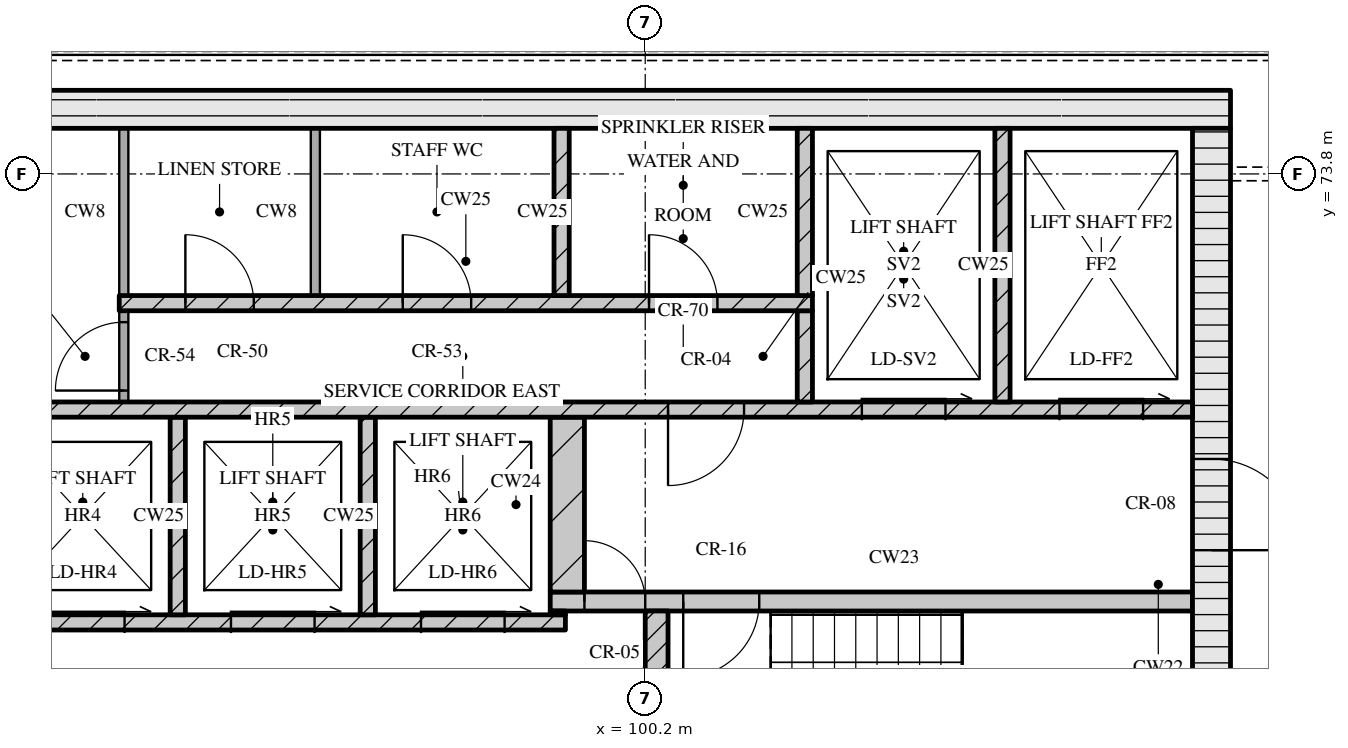
"""IFC4 building model, lengths in metres.
Left out: names, types, materials, properties, quantities, classifications, styles, units other than length and angle.
Written with IfcOpenShell. Run it as: python <this file> out.ifc"""

import sys

from ifc_helpers import new_model, si_unit, direction, frame, frame_2d, origin, place, context, subcontext, project, spatial, rectangle, extrude, element, fill, save


model = new_model("IFC4")
c1 = context("Model", 3, precision=1e-05, world=origin(), true_north=direction((0.0, 1.0)))
c2 = subcontext(c1, "Body", "Model", "MODEL_VIEW")
j1 = project(units=[si_unit("LENGTHUNIT", "METRE"), si_unit("PLANEANGLEUNIT", "RADIAN")], contexts=[c1])
p1 = place(None, origin())
s1 = spatial("IfcSite", under=j1, at=p1, CompositionType="ELEMENT")
p2 = place(p1, origin())
s2 = spatial("IfcBuilding", under=s1, at=p2, CompositionType="ELEMENT")
p3 = place(p2, frame((0.0, 0.0, 267.15)))
s3 = spatial("IfcBuildingStorey", under=s2, at=p3, CompositionType="ELEMENT", Elevation=267.15)
p4 = place(p3, frame((67.3, 74.65, 0.0), z_axis=(0.0, 0.0, 1.0), x_axis=(1.0, 0.0, 0.0)))
e1 = element("IfcWall", 1, at=p4, inside=s3, PredefinedType="SOLIDWALL", context=c2, shape_type="SweptSolid", body=[
    extrude(rectangle(XDim=40.6, YDim=0.5, at=frame_2d((20.3, 0.0))), origin(), (0.0, 0.0, 1.0), 3.32),
])
p5 = place(p3, frame((107.65, 62.4, 0.0), z_axis=(0.0, 0.0, 1.0), x_axis=(0.0, 1.0, 0.0)))
e2 = element("IfcWall", 2, at=p5, inside=s3, PredefinedType="SOLIDWALL", context=c2, shape_type="SweptSolid", body=[
    extrude(rectangle(XDim=12.0, YDim=0.5, at=frame_2d((6.0, 0.0))), origin(), (0.0, 0.0, 1.0), 3.32),
])
p6 = place(p5, frame((6.45, 0.0, 0.0)))
e3 = element("IfcOpeningElement", 3, at=p6, cuts=e2, PredefinedType="OPENING", context=c2, shape_type="SweptSolid", body=[
    extrude(rectangle(XDim=1.2, YDim=2.1, at=frame_2d((0.6, 1.05))), frame((0.0, 0.26, 0.0), z_axis=(0.0, -1.0, 0.0), x_axis=(1.0, 0.0, 0.0)), (0.0, 0.0, 1.0), 0.52),
])
p7 = place(p3, frame((100.35, 65.2, 0.0), z_axis=(0.0, 0.0, 1.0), x_axis=(0.0, 1.0, 0.0)))
e4 = element("IfcWall", 4, at=p7, inside=s3, PredefinedType="SOLIDWALL", context=c2, shape_type="SweptSolid", body=[
    extrude(rectangle(XDim=2.85, YDim=0.3, at=frame_2d((1.425, 0.0))), origin(), (0.0, 0.0, 1.0), 3.32),
])
p8 = place(p3, frame((76.05, 67.9, 0.0), z_axis=(0.0, 0.0, 1.0), x_axis=(1.0, 0.0, 0.0)))
e5 = element("IfcWall", 5, at=p8, inside=s3, PredefinedType="SOLIDWALL", context=c2, shape_type="SweptSolid", body=[
    extrude(rectangle(XDim=23.1, YDim=0.2, at=frame_2d((11.55, 0.0))), origin(), (0.0, 0.0, 1.0), 3.32),
])
p9 = place(p8, frame((1.4, 0.0, 0.0)))
e6 = element("IfcOpeningElement", 6, at=p9, cuts=e5, PredefinedType="OPENING", context=c2, shape_type="SweptSolid", body=[
    extrude(rectangle(XDim=0.9, YDim=2.1, at=frame_2d((0.45, 1.05))), frame((0.0, 0.11, 0.0), z_axis=(0.0, -1.0, 0.0), x_axis=(1.0, 0.0, 0.0)), (0.0, 0.0, 1.0), 0.22),
])
p10 = place(p8, frame((5.11, 0.0, 0.0)))
e7 = element("IfcOpeningElement", 7, at=p10, cuts=e5, PredefinedType="OPENING", context=c2, shape_type="SweptSolid", body=[
    extrude(rectangle(XDim=0.9, YDim=2.1, at=frame_2d((0.45, 1.05))), frame((0.0, 0.11, 0.0), z_axis=(0.0, -1.0, 0.0), x_axis=(1.0, 0.0, 0.0)), (0.0, 0.0, 1.0), 0.22),
])
p11 = place(p8, frame((8.45, 0.0, 0.0)))
e8 = element("IfcOpeningElement", 8, at=p11, cuts=e5, PredefinedType="OPENING", context=c2, shape_type="SweptSolid", body=[
    extrude(rectangle(XDim=0.9, YDim=2.1, at=frame_2d((0.45, 1.05))), frame((0.0, 0.11, 0.0), z_axis=(0.0, -1.0, 0.0), x_axis=(1.0, 0.0, 0.0)), (0.0, 0.0, 1.0), 0.22),
])
p12 = place(p8, frame((10.91, 0.0, 0.0)))
e9 = element("IfcOpeningElement", 9, at=p12, cuts=e5, PredefinedType="OPENING", context=c2, shape_type="SweptSolid", body=[
    extrude(rectangle(XDim=0.9, YDim=2.1, at=frame_2d((0.45, 1.05))), frame((0.0, 0.11, 0.0), z_axis=(0.0, -1.0, 0.0), x_axis=(1.0, 0.0, 0.0)), (0.0, 0.0, 1.0), 0.22),
])
p13 = place(p8, frame((13.55, 0.0, 0.0)))
e10 = element("IfcOpeningElement", 10, at=p13, cuts=e5, PredefinedType="OPENING", context=c2, shape_type="SweptSolid", body=[
    extrude(rectangle(XDim=1.0, YDim=2.1, at=frame_2d((0.5, 1.05))), frame((0.0, 0.11, 0.0), z_axis=(0.0, -1.0, 0.0), x_axis=(1.0, 0.0, 0.0)), (0.0, 0.0, 1.0), 0.22),
])
p14 = place(p8, frame((16.2, 0.0, 0.0)))
e11 = element("IfcOpeningElement", 11, at=p14, cuts=e5, PredefinedType="OPENING", context=c2, shape_type="SweptSolid", body=[
    extrude(rectangle(XDim=1.1, YDim=2.1, at=frame_2d((0.55, 1.05))), frame((0.0, 0.11, 0.0), z_axis=(0.0, -1.0, 0.0), x_axis=(1.0, 0.0, 0.0)), (0.0, 0.0, 1.0), 0.22),
])
p15 = place(p8, frame((18.7, 0.0, 0.0)))
e12 = element("IfcOpeningElement", 12, at=p15, cuts=e5, PredefinedType="OPENING", context=c2, shape_type="SweptSolid", body=[
    extrude(rectangle(XDim=1.1, YDim=2.1, at=frame_2d((0.55, 1.05))), frame((0.0, 0.11, 0.0), z_axis=(0.0, -1.0, 0.0), x_axis=(1.0, 0.0, 0.0)), (0.0, 0.0, 1.0), 0.22),
])
p16 = place(p8, frame((21.2, 0.0, 0.0)))
e13 = element("IfcOpeningElement", 13, at=p16, cuts=e5, PredefinedType="OPENING", context=c2, shape_type="SweptSolid", body=[
    extrude(rectangle(XDim=1.1, YDim=2.1, at=frame_2d((0.55, 1.05))), frame((0.0, 0.11, 0.0), z_axis=(0.0, -1.0, 0.0), x_axis=(1.0, 0.0, 0.0)), (0.0, 0.0, 1.0), 0.22),
])
for number, where, z_axis, x_axis in (
    (14, (94.05, 68.0, 0.0), (0.0, 0.0, 1.0), (0.0, 1.0, 0.0)),
    (15, (96.55, 68.0, 0.0), (0.0, 0.0, 1.0), (0.0, 1.0, 0.0)),
):
    element("IfcWall", number, at=place(p3, frame(where, z_axis=z_axis, x_axis=x_axis)), inside=s3, PredefinedType="SOLIDWALL", context=c2, shape_type="SweptSolid", body=[
        extrude(rectangle(XDim=2.6, YDim=0.2, at=frame_2d((1.3, 0.0))), origin(), (0.0, 0.0, 1.0), 3.32),
    ])
p17 = place(p3, frame((98.95, 68.025, 0.0), z_axis=(0.0, 0.0, 1.0), x_axis=(1.0, 0.0, 0.0)))
e16 = element("IfcWall", 16, at=p17, inside=s3, PredefinedType="SOLIDWALL", context=c2, shape_type="SweptSolid", body=[
    extrude(rectangle(XDim=0.2, YDim=0.05, at=frame_2d((0.1, 0.0))), origin(), (0.0, 0.0, 1.0), 3.32),
])
p18 = place(p3, frame((98.95, 68.175, 0.0), z_axis=(0.0, 0.0, 1.0), x_axis=(1.0, 0.0, 0.0)))
e17 = element("IfcWall", 17, at=p18, inside=s3, PredefinedType="SOLIDWALL", context=c2, shape_type="SweptSolid", body=[
    extrude(rectangle(XDim=8.45, YDim=0.25, at=frame_2d((4.225, 0.0))), origin(), (0.0, 0.0, 1.0), 3.32),
])
p19 = place(p18, frame((0.45, 0.0, 0.0)))
e18 = element("IfcOpeningElement", 18, at=p19, cuts=e17, PredefinedType="OPENING", context=c2, shape_type="SweptSolid", body=[
    extrude(rectangle(XDim=0.8, YDim=2.1, at=frame_2d((0.4, 1.05))), frame((0.0, 0.135, 0.0), z_axis=(0.0, -1.0, 0.0), x_axis=(1.0, 0.0, 0.0)), (0.0, 0.0, 1.0), 0.27),
])
p20 = place(p18, frame((1.75, 0.0, 0.0)))
e19 = element("IfcOpeningElement", 19, at=p20, cuts=e17, PredefinedType="OPENING", context=c2, shape_type="SweptSolid", body=[
    extrude(rectangle(XDim=1.0, YDim=2.1, at=frame_2d((0.5, 1.05))), frame((0.0, 0.135, 0.0), z_axis=(0.0, -1.0, 0.0), x_axis=(1.0, 0.0, 0.0)), (0.0, 0.0, 1.0), 0.27),
])
p21 = place(p3, frame((99.175, 68.3, 0.0), z_axis=(0.0, 0.0, 1.0), x_axis=(0.0, 1.0, 0.0)))
e20 = element("IfcWall", 20, at=p21, inside=s3, PredefinedType="SOLIDWALL", context=c2, shape_type="SweptSolid", body=[
    extrude(rectangle(XDim=2.3, YDim=0.45, at=frame_2d((1.15, 0.0))), origin(), (0.0, 0.0, 1.0), 3.32),
])
p22 = place(p3, frame((67.8, 70.7, 0.0), z_axis=(0.0, 0.0, 1.0), x_axis=(1.0, 0.0, 0.0)))
e21 = element("IfcWall", 21, at=p22, inside=s3, PredefinedType="SOLIDWALL", context=c2, shape_type="SweptSolid", body=[
    extrude(rectangle(XDim=39.6, YDim=0.2, at=frame_2d((19.8, 0.0))), origin(), (0.0, 0.0, 1.0), 3.32),
])
p23 = place(p22, frame((0.65, 0.0, 0.0)))
e22 = element("IfcOpeningElement", 22, at=p23, cuts=e21, PredefinedType="OPENING", context=c2, shape_type="SweptSolid", body=[
    extrude(rectangle(XDim=1.1, YDim=2.1, at=frame_2d((0.55, 1.05))), frame((0.0, 0.11, 0.0), z_axis=(0.0, -1.0, 0.0), x_axis=(1.0, 0.0, 0.0)), (0.0, 0.0, 1.0), 0.22),
])
p24 = place(p22, frame((3.25, 0.0, 0.0)))
e23 = element("IfcOpeningElement", 23, at=p24, cuts=e21, PredefinedType="OPENING", context=c2, shape_type="SweptSolid", body=[
    extrude(rectangle(XDim=1.1, YDim=2.1, at=frame_2d((0.55, 1.05))), frame((0.0, 0.11, 0.0), z_axis=(0.0, -1.0, 0.0), x_axis=(1.0, 0.0, 0.0)), (0.0, 0.0, 1.0), 0.22),
])
p25 = place(p22, frame((5.9, 0.0, 0.0)))
e24 = element("IfcOpeningElement", 24, at=p25, cuts=e21, PredefinedType="OPENING", context=c2, shape_type="SweptSolid", body=[
    extrude(rectangle(XDim=1.0, YDim=2.1, at=frame_2d((0.5, 1.05))), frame((0.0, 0.11, 0.0), z_axis=(0.0, -1.0, 0.0), x_axis=(1.0, 0.0, 0.0)), (0.0, 0.0, 1.0), 0.22),
])
p26 = place(p22, frame((21.7, 0.0, 0.0)))
e25 = element("IfcOpeningElement", 25, at=p26, cuts=e21, PredefinedType="OPENING", context=c2, shape_type="SweptSolid", body=[
    extrude(rectangle(XDim=1.0, YDim=2.1, at=frame_2d((0.5, 1.05))), frame((0.0, 0.11, 0.0), z_axis=(0.0, -1.0, 0.0), x_axis=(1.0, 0.0, 0.0)), (0.0, 0.0, 1.0), 0.22),
])
p27 = place(p22, frame((32.7, 0.0, 0.0)))
e26 = element("IfcOpeningElement", 26, at=p27, cuts=e21, PredefinedType="OPENING", context=c2, shape_type="SweptSolid", body=[
    extrude(rectangle(XDim=1.0, YDim=2.1, at=frame_2d((0.5, 1.05))), frame((0.0, 0.11, 0.0), z_axis=(0.0, -1.0, 0.0), x_axis=(1.0, 0.0, 0.0)), (0.0, 0.0, 1.0), 0.22),
])
p28 = place(p22, frame((35.25, 0.0, 0.0)))
e27 = element("IfcOpeningElement", 27, at=p28, cuts=e21, PredefinedType="OPENING", context=c2, shape_type="SweptSolid", body=[
    extrude(rectangle(XDim=1.1, YDim=2.1, at=frame_2d((0.55, 1.05))), frame((0.0, 0.11, 0.0), z_axis=(0.0, -1.0, 0.0), x_axis=(1.0, 0.0, 0.0)), (0.0, 0.0, 1.0), 0.22),
])
p29 = place(p22, frame((37.85, 0.0, 0.0)))
e28 = element("IfcOpeningElement", 28, at=p29, cuts=e21, PredefinedType="OPENING", context=c2, shape_type="SweptSolid", body=[
    extrude(rectangle(XDim=1.1, YDim=2.1, at=frame_2d((0.55, 1.05))), frame((0.0, 0.11, 0.0), z_axis=(0.0, -1.0, 0.0), x_axis=(1.0, 0.0, 0.0)), (0.0, 0.0, 1.0), 0.22),
])
p30 = place(p3, frame((93.34, 70.8, 0.0), z_axis=(0.0, 0.0, 1.0), x_axis=(0.0, 1.0, 0.0)))
e29 = element("IfcWall", 29, at=p30, inside=s3, PredefinedType="PARTITIONING", context=c2, shape_type="SweptSolid", body=[
    extrude(rectangle(XDim=1.2, YDim=0.12, at=frame_2d((0.6, 0.0))), origin(), (0.0, 0.0, 1.0), 3.32),
])
p31 = place(p30, frame((0.15, 0.0, 0.0)))
e30 = element("IfcOpeningElement", 30, at=p31, cuts=e29, PredefinedType="OPENING", context=c2, shape_type="SweptSolid", body=[
    extrude(rectangle(XDim=0.9, YDim=2.1, at=frame_2d((0.45, 1.05))), frame((0.0, 0.07, 0.0), z_axis=(0.0, -1.0, 0.0), x_axis=(1.0, 0.0, 0.0)), (0.0, 0.0, 1.0), 0.14),
])
p32 = place(p3, frame((102.3, 70.8, 0.0), z_axis=(0.0, 0.0, 1.0), x_axis=(0.0, 1.0, 0.0)))
e31 = element("IfcWall", 31, at=p32, inside=s3, PredefinedType="SOLIDWALL", context=c2, shape_type="SweptSolid", body=[
    extrude(rectangle(XDim=1.2, YDim=0.2, at=frame_2d((0.6, 0.0))), origin(), (0.0, 0.0, 1.0), 3.32),
])
p33 = place(p3, frame((104.9, 70.8, 0.0), z_axis=(0.0, 0.0, 1.0), x_axis=(0.0, 1.0, 0.0)))
e32 = element("IfcWall", 32, at=p33, inside=s3, PredefinedType="SOLIDWALL", context=c2, shape_type="SweptSolid", body=[
    extrude(rectangle(XDim=3.6, YDim=0.2, at=frame_2d((1.8, 0.0))), origin(), (0.0, 0.0, 1.0), 3.32),
])
p34 = place(p3, frame((93.28, 72.1, 0.0), z_axis=(0.0, 0.0, 1.0), x_axis=(1.0, 0.0, 0.0)))
e33 = element("IfcWall", 33, at=p34, inside=s3, PredefinedType="SOLIDWALL", context=c2, shape_type="SweptSolid", body=[
    extrude(rectangle(XDim=9.12, YDim=0.2, at=frame_2d((4.56, 0.0))), origin(), (0.0, 0.0, 1.0), 3.32),
])
p35 = place(p34, frame((0.87, 0.0, 0.0)))
e34 = element("IfcOpeningElement", 34, at=p35, cuts=e33, PredefinedType="OPENING", context=c2, shape_type="SweptSolid", body=[
    extrude(rectangle(XDim=0.9, YDim=2.1, at=frame_2d((0.45, 1.05))), frame((0.0, 0.11, 0.0), z_axis=(0.0, -1.0, 0.0), x_axis=(1.0, 0.0, 0.0)), (0.0, 0.0, 1.0), 0.22),
])
p36 = place(p34, frame((3.73, 0.0, 0.0)))
e35 = element("IfcOpeningElement", 35, at=p36, cuts=e33, PredefinedType="OPENING", context=c2, shape_type="SweptSolid", body=[
    extrude(rectangle(XDim=0.9, YDim=2.1, at=frame_2d((0.45, 1.05))), frame((0.0, 0.11, 0.0), z_axis=(0.0, -1.0, 0.0), x_axis=(1.0, 0.0, 0.0)), (0.0, 0.0, 1.0), 0.22),
])
p37 = place(p34, frame((6.97, 0.0, 0.0)))
e36 = element("IfcOpeningElement", 36, at=p37, cuts=e33, PredefinedType="OPENING", context=c2, shape_type="SweptSolid", body=[
    extrude(rectangle(XDim=0.9, YDim=2.1, at=frame_2d((0.45, 1.05))), frame((0.0, 0.11, 0.0), z_axis=(0.0, -1.0, 0.0), x_axis=(1.0, 0.0, 0.0)), (0.0, 0.0, 1.0), 0.22),
])
for number, where, z_axis, x_axis in (
    (37, (93.34, 72.2, 0.0), (0.0, 0.0, 1.0), (0.0, 1.0, 0.0)),
    (38, (95.86, 72.2, 0.0), (0.0, 0.0, 1.0), (0.0, 1.0, 0.0)),
):
    element("IfcWall", number, at=place(p3, frame(where, z_axis=z_axis, x_axis=x_axis)), inside=s3, PredefinedType="PARTITIONING", context=c2, shape_type="SweptSolid", body=[
        extrude(rectangle(XDim=2.2, YDim=0.12, at=frame_2d((1.1, 0.0))), origin(), (0.0, 0.0, 1.0), 3.32),
    ])
for number, where, z_axis, x_axis in (
    (39, (99.1, 72.2, 0.0), (0.0, 0.0, 1.0), (0.0, 1.0, 0.0)),
    (40, (102.3, 72.2, 0.0), (0.0, 0.0, 1.0), (0.0, 1.0, 0.0)),
):
    element("IfcWall", number, at=place(p3, frame(where, z_axis=z_axis, x_axis=x_axis)), inside=s3, PredefinedType="SOLIDWALL", context=c2, shape_type="SweptSolid", body=[
        extrude(rectangle(XDim=2.2, YDim=0.2, at=frame_2d((1.1, 0.0))), origin(), (0.0, 0.0, 1.0), 3.32),
    ])
p38 = place(p14, origin())
e41 = element("IfcDoor", 41, at=p38, inside=s3, OperationType="SLIDING_TO_RIGHT", PredefinedType="DOOR", context=c2, shape_type="SweptSolid", body=[
    extrude(rectangle(XDim=1.1, YDim=2.1, at=frame_2d((0.55, 1.05))), frame((0.0, 0.025, 0.0), z_axis=(0.0, -1.0, 0.0), x_axis=(1.0, 0.0, 0.0)), (0.0, 0.0, 1.0), 0.05),
])
fill(e11, e41)
p39 = place(p15, origin())
e42 = element("IfcDoor", 42, at=p39, inside=s3, OperationType="SLIDING_TO_RIGHT", PredefinedType="DOOR", context=c2, shape_type="SweptSolid", body=[
    extrude(rectangle(XDim=1.1, YDim=2.1, at=frame_2d((0.55, 1.05))), frame((0.0, 0.025, 0.0), z_axis=(0.0, -1.0, 0.0), x_axis=(1.0, 0.0, 0.0)), (0.0, 0.0, 1.0), 0.05),
])
fill(e12, e42)
p40 = place(p16, origin())
e43 = element("IfcDoor", 43, at=p40, inside=s3, OperationType="SLIDING_TO_RIGHT", PredefinedType="DOOR", context=c2, shape_type="SweptSolid", body=[
    extrude(rectangle(XDim=1.1, YDim=2.1, at=frame_2d((0.55, 1.05))), frame((0.0, 0.025, 0.0), z_axis=(0.0, -1.0, 0.0), x_axis=(1.0, 0.0, 0.0)), (0.0, 0.0, 1.0), 0.05),
])
fill(e13, e43)
p41 = place(p19, origin())
e44 = element("IfcDoor", 44, at=p41, inside=s3, OperationType="SINGLE_SWING_LEFT", PredefinedType="DOOR", context=c2, shape_type="SweptSolid", body=[
    extrude(rectangle(XDim=0.8, YDim=2.1, at=frame_2d((0.4, 1.05))), frame((0.0, 0.025, 0.0), z_axis=(0.0, -1.0, 0.0), x_axis=(1.0, 0.0, 0.0)), (0.0, 0.0, 1.0), 0.05),
])
fill(e18, e44)
p42 = place(p20, origin())
e45 = element("IfcDoor", 45, at=p42, inside=s3, OperationType="SINGLE_SWING_RIGHT", PredefinedType="DOOR", context=c2, shape_type="SweptSolid", body=[
    extrude(rectangle(XDim=1.0, YDim=2.1, at=frame_2d((0.5, 1.05))), frame((0.0, 0.025, 0.0), z_axis=(0.0, -1.0, 0.0), x_axis=(1.0, 0.0, 0.0)), (0.0, 0.0, 1.0), 0.05),
])
fill(e19, e45)
p43 = place(p6, origin())
e46 = element("IfcDoor", 46, at=p43, inside=s3, OperationType="SINGLE_SWING_RIGHT", PredefinedType="DOOR", context=c2, shape_type="SweptSolid", body=[
    extrude(rectangle(XDim=1.2, YDim=2.1, at=frame_2d((0.6, 1.05))), frame((0.0, 0.025, 0.0), z_axis=(0.0, -1.0, 0.0), x_axis=(1.0, 0.0, 0.0)), (0.0, 0.0, 1.0), 0.05),
])
fill(e3, e46)
p44 = place(p27, origin())
e47 = element("IfcDoor", 47, at=p44, inside=s3, OperationType="SINGLE_SWING_RIGHT", PredefinedType="DOOR", context=c2, shape_type="SweptSolid", body=[
    extrude(rectangle(XDim=1.0, YDim=2.1, at=frame_2d((0.5, 1.05))), frame((0.0, 0.025, 0.0), z_axis=(0.0, -1.0, 0.0), x_axis=(1.0, 0.0, 0.0)), (0.0, 0.0, 1.0), 0.05),
])
fill(e26, e47)
p45 = place(p28, origin())
e48 = element("IfcDoor", 48, at=p45, inside=s3, OperationType="SLIDING_TO_RIGHT", PredefinedType="DOOR", context=c2, shape_type="SweptSolid", body=[
    extrude(rectangle(XDim=1.1, YDim=2.1, at=frame_2d((0.55, 1.05))), frame((0.0, 0.025, 0.0), z_axis=(0.0, -1.0, 0.0), x_axis=(1.0, 0.0, 0.0)), (0.0, 0.0, 1.0), 0.05),
])
fill(e27, e48)
p46 = place(p29, origin())
e49 = element("IfcDoor", 49, at=p46, inside=s3, OperationType="SLIDING_TO_RIGHT", PredefinedType="DOOR", context=c2, shape_type="SweptSolid", body=[
    extrude(rectangle(XDim=1.1, YDim=2.1, at=frame_2d((0.55, 1.05))), frame((0.0, 0.025, 0.0), z_axis=(0.0, -1.0, 0.0), x_axis=(1.0, 0.0, 0.0)), (0.0, 0.0, 1.0), 0.05),
])
fill(e28, e49)
p47 = place(p31, origin())
e50 = element("IfcDoor", 50, at=p47, inside=s3, OperationType="SINGLE_SWING_LEFT", PredefinedType="DOOR", context=c2, shape_type="SweptSolid", body=[
    extrude(rectangle(XDim=0.9, YDim=2.1, at=frame_2d((0.45, 1.05))), frame((0.0, 0.025, 0.0), z_axis=(0.0, -1.0, 0.0), x_axis=(1.0, 0.0, 0.0)), (0.0, 0.0, 1.0), 0.05),
])
fill(e30, e50)
p48 = place(p35, origin())
e51 = element("IfcDoor", 51, at=p48, inside=s3, OperationType="SINGLE_SWING_LEFT", PredefinedType="DOOR", context=c2, shape_type="SweptSolid", body=[
    extrude(rectangle(XDim=0.9, YDim=2.1, at=frame_2d((0.45, 1.05))), frame((0.0, 0.025, 0.0), z_axis=(0.0, -1.0, 0.0), x_axis=(1.0, 0.0, 0.0)), (0.0, 0.0, 1.0), 0.05),
])
fill(e34, e51)
p49 = place(p36, origin())
e52 = element("IfcDoor", 52, at=p49, inside=s3, OperationType="SINGLE_SWING_LEFT", PredefinedType="DOOR", context=c2, shape_type="SweptSolid", body=[
    extrude(rectangle(XDim=0.9, YDim=2.1, at=frame_2d((0.45, 1.05))), frame((0.0, 0.025, 0.0), z_axis=(0.0, -1.0, 0.0), x_axis=(1.0, 0.0, 0.0)), (0.0, 0.0, 1.0), 0.05),
])
fill(e35, e52)
p50 = place(p37, origin())
e53 = element("IfcDoor", 53, at=p50, inside=s3, OperationType="SINGLE_SWING_LEFT", PredefinedType="DOOR", context=c2, shape_type="SweptSolid", body=[
    extrude(rectangle(XDim=0.9, YDim=2.1, at=frame_2d((0.45, 1.05))), frame((0.0, 0.025, 0.0), z_axis=(0.0, -1.0, 0.0), x_axis=(1.0, 0.0, 0.0)), (0.0, 0.0, 1.0), 0.05),
])
fill(e36, e53)
save(model, sys.argv[1])
